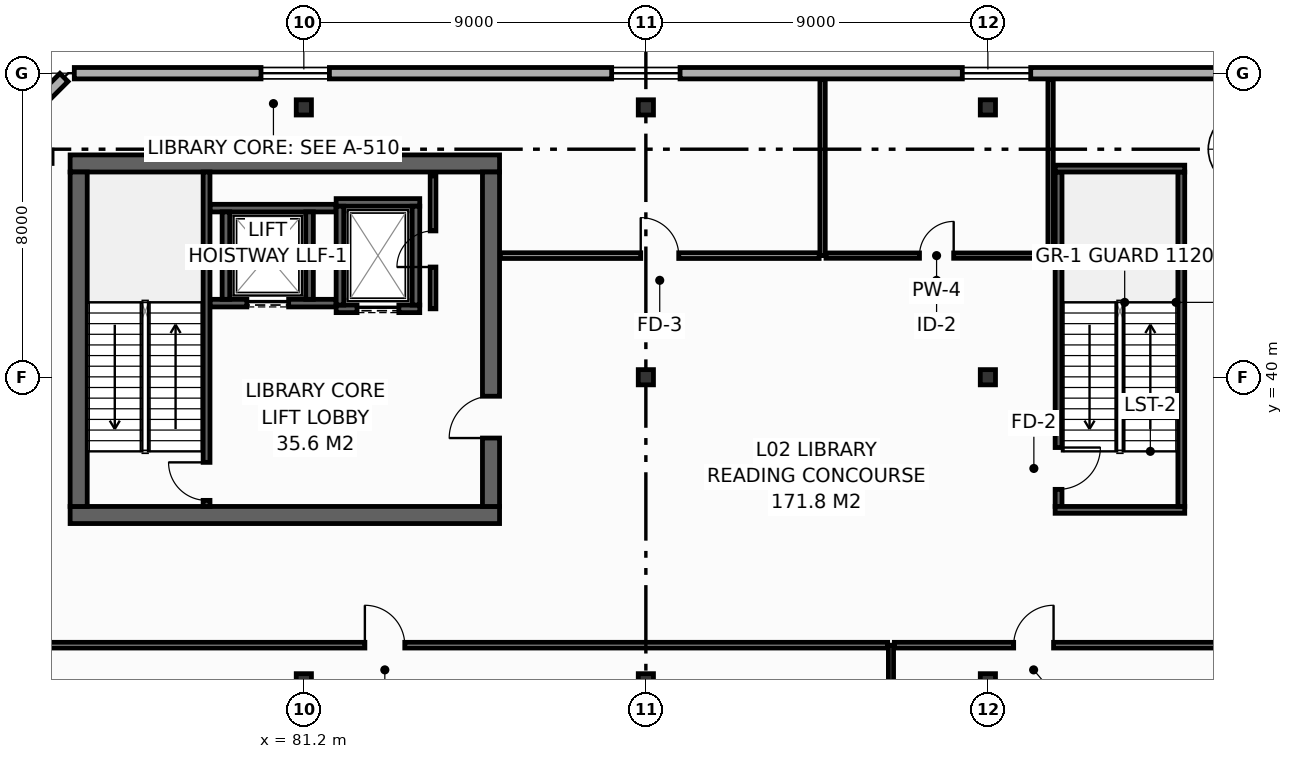
"""IFC4 building model, lengths in metres.
Left out: names, types, materials, properties, quantities, classifications, styles, units other than length and angle.
Written with IfcOpenShell. Run it as: python <this file> out.ifc"""

import sys

from ifc_helpers import new_model, si_unit, direction, frame, frame_2d, origin, origin_2d, place, context, subcontext, project, spatial, rectangle, i_section, extrude, element, fill, save


model = new_model("IFC4")
c1 = context("Model", 3, precision=1e-05, world=origin(), true_north=direction((0.0, 1.0)))
c2 = subcontext(c1, "Body", "Model", "MODEL_VIEW")
j1 = project(units=[si_unit("LENGTHUNIT", "METRE"), si_unit("PLANEANGLEUNIT", "RADIAN")], contexts=[c1])
p1 = place(None, origin())
s1 = spatial("IfcSite", under=j1, at=p1, CompositionType="ELEMENT")
p2 = place(p1, origin())
s2 = spatial("IfcBuilding", under=s1, at=p2, CompositionType="ELEMENT")
p3 = place(p2, frame((0.0, 0.0, 11.4)))
s3 = spatial("IfcBuildingStorey", under=s2, at=p3, CompositionType="ELEMENT", Elevation=11.4)
for number, where, z_axis, x_axis in (
    (1, (75.05, 36.375, 0.0), (0.0, 0.0, 1.0), (1.0, 0.0, 0.0)),
    (2, (75.05, 45.625, 0.0), (0.0, 0.0, 1.0), (1.0, 0.0, 0.0)),
):
    element("IfcWall", number, at=place(p3, frame(where, z_axis=z_axis, x_axis=x_axis)), inside=s3, PredefinedType="SHEAR", context=c2, shape_type="SweptSolid", body=[
        extrude(rectangle(XDim=11.3, YDim=0.45, at=frame_2d((5.65, 0.0))), origin(), (0.0, 0.0, 1.0), 5.1),
    ])
p4 = place(p3, frame((75.275, 36.6, 0.0), z_axis=(0.0, 0.0, 1.0), x_axis=(0.0, 1.0, 0.0)))
e3 = element("IfcWall", 3, at=p4, inside=s3, PredefinedType="SHEAR", context=c2, shape_type="SweptSolid", body=[
    extrude(rectangle(XDim=8.8, YDim=0.45, at=frame_2d((4.4, 0.0))), origin(), (0.0, 0.0, 1.0), 5.1),
])
p5 = place(p3, frame((86.125, 36.6, 0.0), z_axis=(0.0, 0.0, 1.0), x_axis=(0.0, 1.0, 0.0)))
e4 = element("IfcWall", 4, at=p5, inside=s3, PredefinedType="SHEAR", context=c2, shape_type="SweptSolid", body=[
    extrude(rectangle(XDim=8.8, YDim=0.45, at=frame_2d((4.4, 0.0))), origin(), (0.0, 0.0, 1.0), 5.1),
])
p6 = place(p5, frame((1.8, 0.0, 0.0)))
e5 = element("IfcOpeningElement", 5, at=p6, cuts=e4, PredefinedType="OPENING", context=c2, shape_type="SweptSolid", body=[
    extrude(rectangle(XDim=1.1, YDim=2.15, at=frame_2d((0.55, 1.075))), frame((0.0, 0.235, 0.0), z_axis=(0.0, -1.0, 0.0), x_axis=(1.0, 0.0, 0.0)), (0.0, 0.0, 1.0), 0.47),
])
for number, where, z_axis, x_axis in (
    (6, (81.2, 32.0, 0.0), (0.0, 0.0, 1.0), (1.0, 0.0, 0.0)),
    (7, (81.2, 47.1, 0.0), (0.0, 0.0, 1.0), (1.0, 0.0, 0.0)),
    (8, (90.2, 32.0, 0.0), (0.0, 0.0, 1.0), (1.0, 0.0, 0.0)),
    (9, (90.2, 40.0, 0.0), (0.0, 0.0, 1.0), (1.0, 0.0, 0.0)),
    (10, (90.2, 47.1, 0.0), (0.0, 0.0, 1.0), (1.0, 0.0, 0.0)),
    (11, (99.2, 32.0, 0.0), (0.0, 0.0, 1.0), (1.0, 0.0, 0.0)),
    (12, (99.2, 40.0, 0.0), (0.0, 0.0, 1.0), (1.0, 0.0, 0.0)),
    (13, (99.2, 47.1, 0.0), (0.0, 0.0, 1.0), (1.0, 0.0, 0.0)),
):
    element("IfcColumn", number, at=place(p3, frame(where, z_axis=z_axis, x_axis=x_axis)), inside=s3, PredefinedType="COLUMN", context=c2, shape_type="SweptSolid", body=[
        extrude(i_section(OverallWidth=0.4, OverallDepth=0.4, WebThickness=0.013, FlangeThickness=0.021, FilletRadius=0.022, at=origin_2d()), origin(), (0.0, 0.0, 1.0), 5.4),
    ])
p7 = place(p3, frame((78.73, 41.95, 0.0), z_axis=(0.0, 0.0, 1.0), x_axis=(1.0, 0.0, 0.0)))
e14 = element("IfcWall", 14, at=p7, inside=s3, PredefinedType="SHEAR", context=c2, shape_type="SweptSolid", body=[
    extrude(rectangle(XDim=3.32, YDim=0.2, at=frame_2d((1.66, 0.0))), origin(), (0.0, 0.0, 1.0), 5.1),
])
p8 = place(p7, frame((0.97, 0.0, 0.0)))
e15 = element("IfcOpeningElement", 15, at=p8, cuts=e14, PredefinedType="OPENING", context=c2, shape_type="SweptSolid", body=[
    extrude(rectangle(XDim=1.1, YDim=2.2, at=frame_2d((0.55, 1.1))), frame((0.0, 0.11, 0.0), z_axis=(0.0, -1.0, 0.0), x_axis=(1.0, 0.0, 0.0)), (0.0, 0.0, 1.0), 0.22),
])
p9 = place(p3, frame((78.73, 44.45, 0.0), z_axis=(0.0, 0.0, 1.0), x_axis=(1.0, 0.0, 0.0)))
e16 = element("IfcWall", 16, at=p9, inside=s3, PredefinedType="SHEAR", context=c2, shape_type="SweptSolid", body=[
    extrude(rectangle(XDim=3.32, YDim=0.2, at=frame_2d((1.66, 0.0))), origin(), (0.0, 0.0, 1.0), 5.1),
])
for number, where, z_axis, x_axis in (
    (17, (79.15, 42.05, 0.0), (0.0, 0.0, 1.0), (0.0, 1.0, 0.0)),
    (18, (81.35, 42.05, 0.0), (0.0, 0.0, 1.0), (0.0, 1.0, 0.0)),
):
    element("IfcWall", number, at=place(p3, frame(where, z_axis=z_axis, x_axis=x_axis)), inside=s3, PredefinedType="SHEAR", context=c2, shape_type="SweptSolid", body=[
        extrude(rectangle(XDim=2.3, YDim=0.2, at=frame_2d((1.15, 0.0))), origin(), (0.0, 0.0, 1.0), 5.1),
    ])
p10 = place(p3, frame((82.05, 41.8, 0.0), z_axis=(0.0, 0.0, 1.0), x_axis=(1.0, 0.0, 0.0)))
e19 = element("IfcWall", 19, at=p10, inside=s3, PredefinedType="SHEAR", context=c2, shape_type="SweptSolid", body=[
    extrude(rectangle(XDim=2.2, YDim=0.2, at=frame_2d((1.1, 0.0))), origin(), (0.0, 0.0, 1.0), 5.1),
])
p11 = place(p10, frame((0.55, 0.0, 0.0)))
e20 = element("IfcOpeningElement", 20, at=p11, cuts=e19, PredefinedType="OPENING", context=c2, shape_type="SweptSolid", body=[
    extrude(rectangle(XDim=1.1, YDim=2.2, at=frame_2d((0.55, 1.1))), frame((0.0, 0.11, 0.0), z_axis=(0.0, -1.0, 0.0), x_axis=(1.0, 0.0, 0.0)), (0.0, 0.0, 1.0), 0.22),
])
p12 = place(p3, frame((82.05, 44.6, 0.0), z_axis=(0.0, 0.0, 1.0), x_axis=(1.0, 0.0, 0.0)))
e21 = element("IfcWall", 21, at=p12, inside=s3, PredefinedType="SHEAR", context=c2, shape_type="SweptSolid", body=[
    extrude(rectangle(XDim=2.2, YDim=0.2, at=frame_2d((1.1, 0.0))), origin(), (0.0, 0.0, 1.0), 5.1),
])
for number, where, z_axis, x_axis in (
    (22, (82.15, 41.9, 0.0), (0.0, 0.0, 1.0), (0.0, 1.0, 0.0)),
    (23, (84.15, 41.9, 0.0), (0.0, 0.0, 1.0), (0.0, 1.0, 0.0)),
):
    element("IfcWall", number, at=place(p3, frame(where, z_axis=z_axis, x_axis=x_axis)), inside=s3, PredefinedType="SHEAR", context=c2, shape_type="SweptSolid", body=[
        extrude(rectangle(XDim=2.6, YDim=0.2, at=frame_2d((1.3, 0.0))), origin(), (0.0, 0.0, 1.0), 5.1),
    ])
p13 = place(p3, frame((78.64, 36.6, 0.0), z_axis=(0.0, 0.0, 1.0), x_axis=(0.0, 1.0, 0.0)))
e24 = element("IfcWall", 24, at=p13, inside=s3, PredefinedType="SHEAR", context=c2, shape_type="SweptSolid", body=[
    extrude(rectangle(XDim=8.8, YDim=0.18, at=frame_2d((4.4, 0.0))), origin(), (0.0, 0.0, 1.0), 5.1),
])
p14 = place(p13, frame((0.16, 0.0, 0.0)))
e25 = element("IfcOpeningElement", 25, at=p14, cuts=e24, PredefinedType="OPENING", context=c2, shape_type="SweptSolid", body=[
    extrude(rectangle(XDim=1.0, YDim=2.15, at=frame_2d((0.5, 1.075))), frame((0.0, 0.1, 0.0), z_axis=(0.0, -1.0, 0.0), x_axis=(1.0, 0.0, 0.0)), (0.0, 0.0, 1.0), 0.2),
])
p15 = place(p3, frame((101.06, 45.4, 0.0), z_axis=(0.0, 0.0, 1.0), x_axis=(0.0, -1.0, 0.0)))
e26 = element("IfcWall", 26, at=p15, inside=s3, PredefinedType="SHEAR", context=c2, shape_type="SweptSolid", body=[
    extrude(rectangle(XDim=8.8, YDim=0.18, at=frame_2d((4.4, 0.0))), origin(), (0.0, 0.0, 1.0), 5.1),
])
p16 = place(p15, frame((7.25, 0.0, 0.0)))
e27 = element("IfcOpeningElement", 27, at=p16, cuts=e26, PredefinedType="OPENING", context=c2, shape_type="SweptSolid", body=[
    extrude(rectangle(XDim=1.1, YDim=2.15, at=frame_2d((0.55, 1.075))), frame((0.0, 0.1, 0.0), z_axis=(0.0, -1.0, 0.0), x_axis=(1.0, 0.0, 0.0)), (0.0, 0.0, 1.0), 0.2),
])
p17 = place(p3, frame((100.97, 36.51, 0.0), z_axis=(0.0, 0.0, 1.0), x_axis=(1.0, 0.0, 0.0)))
e28 = element("IfcWall", 28, at=p17, inside=s3, PredefinedType="SHEAR", context=c2, shape_type="SweptSolid", body=[
    extrude(rectangle(XDim=3.41, YDim=0.18, at=frame_2d((1.705, 0.0))), origin(), (0.0, 0.0, 1.0), 5.1),
])
p18 = place(p3, frame((104.29, 36.6, 0.0), z_axis=(0.0, 0.0, 1.0), x_axis=(0.0, 1.0, 0.0)))
e29 = element("IfcWall", 29, at=p18, inside=s3, PredefinedType="SHEAR", context=c2, shape_type="SweptSolid", body=[
    extrude(rectangle(XDim=8.8, YDim=0.18, at=frame_2d((4.4, 0.0))), origin(), (0.0, 0.0, 1.0), 5.1),
])
p19 = place(p3, frame((104.38, 45.49, 0.0), z_axis=(0.0, 0.0, 1.0), x_axis=(-1.0, 0.0, 0.0)))
e30 = element("IfcWall", 30, at=p19, inside=s3, PredefinedType="SHEAR", context=c2, shape_type="SweptSolid", body=[
    extrude(rectangle(XDim=3.41, YDim=0.18, at=frame_2d((1.705, 0.0))), origin(), (0.0, 0.0, 1.0), 5.1),
])
p20 = place(p3, frame((84.6, 41.8, 0.0), z_axis=(0.0, 0.0, 1.0), x_axis=(0.0, 1.0, 0.0)))
e31 = element("IfcWall", 31, at=p20, inside=s3, PredefinedType="PARTITIONING", context=c2, shape_type="SweptSolid", body=[
    extrude(rectangle(XDim=3.5, YDim=0.15, at=frame_2d((1.75, 0.0))), origin(), (0.0, 0.0, 1.0), 5.1),
])
p21 = place(p20, frame((1.1, 0.0, 0.0)))
e32 = element("IfcOpeningElement", 32, at=p21, cuts=e31, PredefinedType="OPENING", context=c2, shape_type="SweptSolid", body=[
    extrude(rectangle(XDim=0.95, YDim=2.15, at=frame_2d((0.475, 1.075))), frame((0.0, 0.085, 0.0), z_axis=(0.0, -1.0, 0.0), x_axis=(1.0, 0.0, 0.0)), (0.0, 0.0, 1.0), 0.17),
])
p22 = place(p3, frame((105.24, 48.0, 0.0), z_axis=(0.0, 0.0, 1.0), x_axis=(-1.0, 0.0, 0.0)))
e33 = element("IfcWall", 33, at=p22, inside=s3, PredefinedType="STANDARD", context=c2, shape_type="SweptSolid", body=[
    extrude(rectangle(XDim=30.08, YDim=0.3, at=frame_2d((15.04, 0.0))), origin(), (0.0, 0.0, 1.0), 5.1),
])
p23 = place(p22, frame((4.913, 0.0, 0.9)))
e34 = element("IfcOpeningElement", 34, at=p23, cuts=e33, PredefinedType="OPENING", context=c2, shape_type="SweptSolid", body=[
    extrude(rectangle(XDim=1.8, YDim=2.5, at=frame_2d((0.9, 1.25))), frame((0.0, 0.16, 0.0), z_axis=(0.0, -1.0, 0.0), x_axis=(1.0, 0.0, 0.0)), (0.0, 0.0, 1.0), 0.32),
])
p24 = place(p22, frame((14.14, 0.0, 0.9)))
e35 = element("IfcOpeningElement", 35, at=p24, cuts=e33, PredefinedType="OPENING", context=c2, shape_type="SweptSolid", body=[
    extrude(rectangle(XDim=1.8, YDim=2.5, at=frame_2d((0.9, 1.25))), frame((0.0, 0.16, 0.0), z_axis=(0.0, -1.0, 0.0), x_axis=(1.0, 0.0, 0.0)), (0.0, 0.0, 1.0), 0.32),
])
p25 = place(p22, frame((23.367, 0.0, 0.9)))
e36 = element("IfcOpeningElement", 36, at=p25, cuts=e33, PredefinedType="OPENING", context=c2, shape_type="SweptSolid", body=[
    extrude(rectangle(XDim=1.8, YDim=2.5, at=frame_2d((0.9, 1.25))), frame((0.0, 0.16, 0.0), z_axis=(0.0, -1.0, 0.0), x_axis=(1.0, 0.0, 0.0)), (0.0, 0.0, 1.0), 0.32),
])
p26 = place(p3, frame((74.887, 47.887, 0.0), z_axis=(0.0, 0.0, 1.0), x_axis=(-0.707106781187, -0.707106781187, 0.0)))
e37 = element("IfcWall", 37, at=p26, inside=s3, PredefinedType="STANDARD", context=c2, shape_type="SweptSolid", body=[
    extrude(rectangle(XDim=3.64, YDim=0.3, at=frame_2d((1.82, 0.0))), origin(), (0.0, 0.0, 1.0), 5.1),
])
p27 = place(p3, frame((96.65, 28.18, 0.0), z_axis=(0.0, 0.0, 1.0), x_axis=(0.0, 1.0, 0.0)))
e38 = element("IfcWall", 38, at=p27, inside=s3, PredefinedType="PARTITIONING", context=c2, shape_type="SweptSolid", body=[
    extrude(rectangle(XDim=4.77, YDim=0.135, at=frame_2d((2.385, 0.0))), origin(), (0.0, 0.0, 1.0), 4.385),
])
p28 = place(p3, frame((72.3, 32.95, 0.0), z_axis=(0.0, 0.0, 1.0), x_axis=(1.0, 0.0, 0.0)))
e39 = element("IfcWall", 39, at=p28, inside=s3, PredefinedType="PARTITIONING", context=c2, shape_type="SweptSolid", body=[
    extrude(rectangle(XDim=24.262, YDim=0.15, at=frame_2d((12.131, 0.0))), origin(), (0.0, 0.0, 1.0), 4.385),
])
p29 = place(p28, frame((10.506, 0.0, 0.0)))
e40 = element("IfcOpeningElement", 40, at=p29, cuts=e39, PredefinedType="OPENING", context=c2, shape_type="SweptSolid", body=[
    extrude(rectangle(XDim=1.05, YDim=2.15, at=frame_2d((0.525, 1.075))), frame((0.0, 0.085, 0.0), z_axis=(0.0, -1.0, 0.0), x_axis=(1.0, 0.0, 0.0)), (0.0, 0.0, 1.0), 0.17),
])
p30 = place(p3, frame((96.738, 32.95, 0.0), z_axis=(0.0, 0.0, 1.0), x_axis=(1.0, 0.0, 0.0)))
e41 = element("IfcWall", 41, at=p30, inside=s3, PredefinedType="PARTITIONING", context=c2, shape_type="SweptSolid", body=[
    extrude(rectangle(XDim=11.292, YDim=0.15, at=frame_2d((5.646, 0.0))), origin(), (0.0, 0.0, 1.0), 4.385),
])
p31 = place(p30, frame((3.141, 0.0, 0.0)))
e42 = element("IfcOpeningElement", 42, at=p31, cuts=e41, PredefinedType="OPENING", context=c2, shape_type="SweptSolid", body=[
    extrude(rectangle(XDim=1.05, YDim=2.15, at=frame_2d((0.525, 1.075))), frame((0.0, 0.085, 0.0), z_axis=(0.0, -1.0, 0.0), x_axis=(1.0, 0.0, 0.0)), (0.0, 0.0, 1.0), 0.17),
])
p32 = place(p3, frame((94.85, 43.2, 0.0), z_axis=(0.0, 0.0, 1.0), x_axis=(0.0, 1.0, 0.0)))
e43 = element("IfcWall", 43, at=p32, inside=s3, PredefinedType="PARTITIONING", context=c2, shape_type="SweptSolid", body=[
    extrude(rectangle(XDim=4.63, YDim=0.14, at=frame_2d((2.315, 0.0))), origin(), (0.0, 0.0, 1.0), 4.385),
])
p33 = place(p3, frame((100.85, 43.2, 0.0), z_axis=(0.0, 0.0, 1.0), x_axis=(0.0, 1.0, 0.0)))
e44 = element("IfcWall", 44, at=p33, inside=s3, PredefinedType="PARTITIONING", context=c2, shape_type="SweptSolid", body=[
    extrude(rectangle(XDim=4.63, YDim=0.14, at=frame_2d((2.315, 0.0))), origin(), (0.0, 0.0, 1.0), 5.1),
])
p34 = place(p3, frame((86.37, 43.2, 0.0), z_axis=(0.0, 0.0, 1.0), x_axis=(1.0, 0.0, 0.0)))
e45 = element("IfcWall", 45, at=p34, inside=s3, PredefinedType="PARTITIONING", context=c2, shape_type="SweptSolid", body=[
    extrude(rectangle(XDim=8.39, YDim=0.15, at=frame_2d((4.195, 0.0))), origin(), (0.0, 0.0, 1.0), 4.385),
])
p35 = place(p34, frame((3.695, 0.0, 0.0)))
e46 = element("IfcOpeningElement", 46, at=p35, cuts=e45, PredefinedType="OPENING", context=c2, shape_type="SweptSolid", body=[
    extrude(rectangle(XDim=1.0, YDim=2.15, at=frame_2d((0.5, 1.075))), frame((0.0, 0.085, 0.0), z_axis=(0.0, -1.0, 0.0), x_axis=(1.0, 0.0, 0.0)), (0.0, 0.0, 1.0), 0.17),
])
p36 = place(p3, frame((94.94, 43.2, 0.0), z_axis=(0.0, 0.0, 1.0), x_axis=(1.0, 0.0, 0.0)))
e47 = element("IfcWall", 47, at=p36, inside=s3, PredefinedType="PARTITIONING", context=c2, shape_type="SweptSolid", body=[
    extrude(rectangle(XDim=5.82, YDim=0.14, at=frame_2d((2.91, 0.0))), origin(), (0.0, 0.0, 1.0), 4.385),
])
p37 = place(p36, frame((2.46, 0.0, 0.0)))
e48 = element("IfcOpeningElement", 48, at=p37, cuts=e47, PredefinedType="OPENING", context=c2, shape_type="SweptSolid", body=[
    extrude(rectangle(XDim=0.9, YDim=2.1, at=frame_2d((0.45, 1.05))), frame((0.0, 0.08, 0.0), z_axis=(0.0, -1.0, 0.0), x_axis=(1.0, 0.0, 0.0)), (0.0, 0.0, 1.0), 0.16),
])
p38 = place(p8, origin())
e49 = element("IfcDoor", 49, at=p38, inside=s3, OperationType="SLIDING_TO_LEFT", PredefinedType="DOOR", context=c2, shape_type="SweptSolid", body=[
    extrude(rectangle(XDim=1.1, YDim=2.2, at=frame_2d((0.55, 1.1))), frame((0.0, 0.025, 0.0), z_axis=(0.0, -1.0, 0.0), x_axis=(1.0, 0.0, 0.0)), (0.0, 0.0, 1.0), 0.05),
])
fill(e15, e49)
p39 = place(p11, origin())
e50 = element("IfcDoor", 50, at=p39, inside=s3, OperationType="SLIDING_TO_LEFT", PredefinedType="DOOR", context=c2, shape_type="SweptSolid", body=[
    extrude(rectangle(XDim=1.1, YDim=2.2, at=frame_2d((0.55, 1.1))), frame((0.0, 0.025, 0.0), z_axis=(0.0, -1.0, 0.0), x_axis=(1.0, 0.0, 0.0)), (0.0, 0.0, 1.0), 0.05),
])
fill(e20, e50)
p40 = place(p14, origin())
e51 = element("IfcDoor", 51, at=p40, inside=s3, OperationType="SINGLE_SWING_RIGHT", PredefinedType="DOOR", context=c2, shape_type="SweptSolid", body=[
    extrude(rectangle(XDim=1.0, YDim=2.15, at=frame_2d((0.5, 1.075))), frame((0.0, 0.025, 0.0), z_axis=(0.0, -1.0, 0.0), x_axis=(1.0, 0.0, 0.0)), (0.0, 0.0, 1.0), 0.05),
])
fill(e25, e51)
p41 = place(p16, origin())
e52 = element("IfcDoor", 52, at=p41, inside=s3, OperationType="SINGLE_SWING_LEFT", PredefinedType="DOOR", context=c2, shape_type="SweptSolid", body=[
    extrude(rectangle(XDim=1.1, YDim=2.15, at=frame_2d((0.55, 1.075))), frame((0.0, 0.025, 0.0), z_axis=(0.0, -1.0, 0.0), x_axis=(1.0, 0.0, 0.0)), (0.0, 0.0, 1.0), 0.05),
])
fill(e27, e52)
p42 = place(p6, origin())
e53 = element("IfcDoor", 53, at=p42, inside=s3, OperationType="SINGLE_SWING_LEFT", PredefinedType="DOOR", context=c2, shape_type="SweptSolid", body=[
    extrude(rectangle(XDim=1.1, YDim=2.15, at=frame_2d((0.55, 1.075))), frame((0.0, 0.025, 0.0), z_axis=(0.0, -1.0, 0.0), x_axis=(1.0, 0.0, 0.0)), (0.0, 0.0, 1.0), 0.05),
])
fill(e5, e53)
p43 = place(p21, origin())
e54 = element("IfcDoor", 54, at=p43, inside=s3, OperationType="SINGLE_SWING_LEFT", PredefinedType="DOOR", context=c2, shape_type="SweptSolid", body=[
    extrude(rectangle(XDim=0.95, YDim=2.15, at=frame_2d((0.475, 1.075))), frame((0.0, 0.025, 0.0), z_axis=(0.0, -1.0, 0.0), x_axis=(1.0, 0.0, 0.0)), (0.0, 0.0, 1.0), 0.05),
])
fill(e32, e54)
p44 = place(p23, origin())
e55 = element("IfcWindow", 55, at=p44, inside=s3, PartitioningType="DOUBLE_PANEL_VERTICAL", PredefinedType="WINDOW", context=c2, shape_type="SweptSolid", body=[
    extrude(rectangle(XDim=1.8, YDim=2.5, at=frame_2d((0.9, 1.25))), frame((0.0, 0.03, 0.0), z_axis=(0.0, -1.0, 0.0), x_axis=(1.0, 0.0, 0.0)), (0.0, 0.0, 1.0), 0.06),
])
fill(e34, e55)
p45 = place(p24, origin())
e56 = element("IfcWindow", 56, at=p45, inside=s3, PartitioningType="DOUBLE_PANEL_VERTICAL", PredefinedType="WINDOW", context=c2, shape_type="SweptSolid", body=[
    extrude(rectangle(XDim=1.8, YDim=2.5, at=frame_2d((0.9, 1.25))), frame((0.0, 0.03, 0.0), z_axis=(0.0, -1.0, 0.0), x_axis=(1.0, 0.0, 0.0)), (0.0, 0.0, 1.0), 0.06),
])
fill(e35, e56)
p46 = place(p25, origin())
e57 = element("IfcWindow", 57, at=p46, inside=s3, PartitioningType="DOUBLE_PANEL_VERTICAL", PredefinedType="WINDOW", context=c2, shape_type="SweptSolid", body=[
    extrude(rectangle(XDim=1.8, YDim=2.5, at=frame_2d((0.9, 1.25))), frame((0.0, 0.03, 0.0), z_axis=(0.0, -1.0, 0.0), x_axis=(1.0, 0.0, 0.0)), (0.0, 0.0, 1.0), 0.06),
])
fill(e36, e57)
p47 = place(p29, origin())
e58 = element("IfcDoor", 58, at=p47, inside=s3, OperationType="SINGLE_SWING_LEFT", PredefinedType="DOOR", context=c2, shape_type="SweptSolid", body=[
    extrude(rectangle(XDim=1.05, YDim=2.15, at=frame_2d((0.525, 1.075))), frame((0.0, 0.025, 0.0), z_axis=(0.0, -1.0, 0.0), x_axis=(1.0, 0.0, 0.0)), (0.0, 0.0, 1.0), 0.05),
])
fill(e40, e58)
p48 = place(p31, origin())
e59 = element("IfcDoor", 59, at=p48, inside=s3, OperationType="SINGLE_SWING_RIGHT", PredefinedType="DOOR", context=c2, shape_type="SweptSolid", body=[
    extrude(rectangle(XDim=1.05, YDim=2.15, at=frame_2d((0.525, 1.075))), frame((0.0, 0.025, 0.0), z_axis=(0.0, -1.0, 0.0), x_axis=(1.0, 0.0, 0.0)), (0.0, 0.0, 1.0), 0.05),
])
fill(e42, e59)
p49 = place(p35, origin())
e60 = element("IfcDoor", 60, at=p49, inside=s3, OperationType="SINGLE_SWING_LEFT", PredefinedType="DOOR", context=c2, shape_type="SweptSolid", body=[
    extrude(rectangle(XDim=1.0, YDim=2.15, at=frame_2d((0.5, 1.075))), frame((0.0, 0.025, 0.0), z_axis=(0.0, -1.0, 0.0), x_axis=(1.0, 0.0, 0.0)), (0.0, 0.0, 1.0), 0.05),
])
fill(e46, e60)
p50 = place(p37, origin())
e61 = element("IfcDoor", 61, at=p50, inside=s3, OperationType="SINGLE_SWING_RIGHT", PredefinedType="DOOR", context=c2, shape_type="SweptSolid", body=[
    extrude(rectangle(XDim=0.9, YDim=2.1, at=frame_2d((0.45, 1.05))), frame((0.0, 0.025, 0.0), z_axis=(0.0, -1.0, 0.0), x_axis=(1.0, 0.0, 0.0)), (0.0, 0.0, 1.0), 0.05),
])
fill(e48, e61)
save(model, sys.argv[1])
